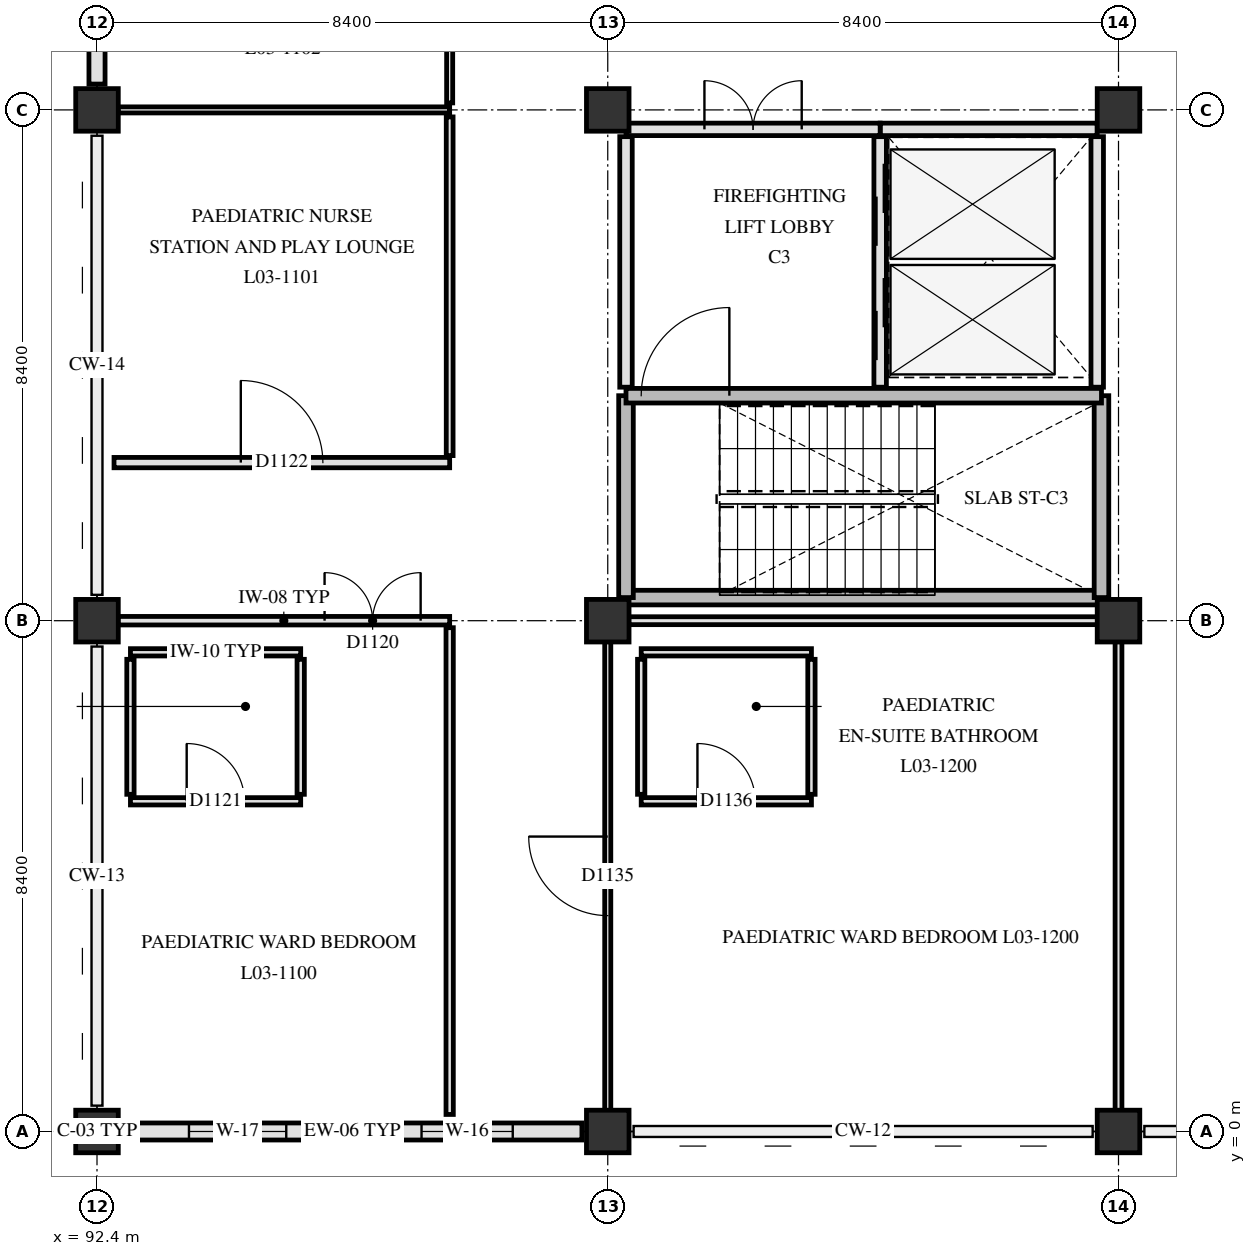
"""IFC4 building model, lengths in metres.
Left out: names, types, materials, properties, quantities, classifications, styles, units other than length and angle.
Written with IfcOpenShell. Run it as: python <this file> out.ifc"""

import sys

from ifc_helpers import new_model, si_unit, direction, frame, frame_2d, origin, origin_2d, place, context, subcontext, project, spatial, rectangle, extrude, element, fill, save


model = new_model("IFC4")
c1 = context("Model", 3, precision=1e-05, world=origin(), true_north=direction((0.0, 1.0)))
c2 = subcontext(c1, "Body", "Model", "MODEL_VIEW")
j1 = project(units=[si_unit("LENGTHUNIT", "METRE"), si_unit("PLANEANGLEUNIT", "RADIAN")], contexts=[c1])
p1 = place(None, origin())
s1 = spatial("IfcSite", under=j1, at=p1, CompositionType="ELEMENT")
p2 = place(p1, origin())
s2 = spatial("IfcBuilding", under=s1, at=p2, CompositionType="ELEMENT")
p3 = place(p2, frame((0.0, 0.0, 14.4)))
s3 = spatial("IfcBuildingStorey", under=s2, at=p3, CompositionType="ELEMENT", Elevation=14.4)
for number, where, z_axis, x_axis in (
    (1, (92.4, 0.0, 0.0), (0.0, 0.0, 1.0), (1.0, 0.0, 0.0)),
    (2, (92.4, 8.4, 0.0), (0.0, 0.0, 1.0), (1.0, 0.0, 0.0)),
    (3, (92.4, 16.8, 0.0), (0.0, 0.0, 1.0), (1.0, 0.0, 0.0)),
    (4, (100.8, 0.0, 0.0), (0.0, 0.0, 1.0), (1.0, 0.0, 0.0)),
    (5, (100.8, 8.4, 0.0), (0.0, 0.0, 1.0), (1.0, 0.0, 0.0)),
    (6, (100.8, 16.8, 0.0), (0.0, 0.0, 1.0), (1.0, 0.0, 0.0)),
    (7, (109.2, 0.0, 0.0), (0.0, 0.0, 1.0), (1.0, 0.0, 0.0)),
    (8, (109.2, 8.4, 0.0), (0.0, 0.0, 1.0), (1.0, 0.0, 0.0)),
    (9, (109.2, 16.8, 0.0), (0.0, 0.0, 1.0), (1.0, 0.0, 0.0)),
):
    element("IfcColumn", number, at=place(p3, frame(where, z_axis=z_axis, x_axis=x_axis)), inside=s3, PredefinedType="COLUMN", context=c2, shape_type="SweptSolid", body=[
        extrude(rectangle(XDim=0.7, YDim=0.7, at=origin_2d()), origin(), (0.0, 0.0, 1.0), 4.2),
    ])
p4 = place(p3, frame((100.375, 0.0, 0.0), z_axis=(0.0, 0.0, 1.0), x_axis=(-1.0, 0.0, 0.0)))
e10 = element("IfcWall", 10, at=p4, inside=s3, PredefinedType="SOLIDWALL", context=c2, shape_type="SweptSolid", body=[
    extrude(rectangle(XDim=7.55, YDim=0.28, at=frame_2d((3.775, 0.0))), origin(), (0.0, 0.0, 1.0), 2.89),
])
p5 = place(p4, frame((1.137, 0.0, 0.85)))
e11 = element("IfcOpeningElement", 11, at=p5, cuts=e10, PredefinedType="OPENING", context=c2, shape_type="SweptSolid", body=[
    extrude(rectangle(XDim=1.5, YDim=1.42, at=frame_2d((0.75, 0.71))), frame((0.0, 0.15, 0.0), z_axis=(0.0, -1.0, 0.0), x_axis=(1.0, 0.0, 0.0)), (0.0, 0.0, 1.0), 0.3),
])
p6 = place(p4, frame((4.863, 0.0, 0.85)))
e12 = element("IfcOpeningElement", 12, at=p6, cuts=e10, PredefinedType="OPENING", context=c2, shape_type="SweptSolid", body=[
    extrude(rectangle(XDim=1.6, YDim=1.42, at=frame_2d((0.8, 0.71))), frame((0.0, 0.15, 0.0), z_axis=(0.0, -1.0, 0.0), x_axis=(1.0, 0.0, 0.0)), (0.0, 0.0, 1.0), 0.3),
])
p7 = place(p3, frame((92.4, 17.225, 0.0), z_axis=(0.0, 0.0, 1.0), x_axis=(0.0, 1.0, 0.0)))
e13 = element("IfcWall", 13, at=p7, inside=s3, PredefinedType="SOLIDWALL", context=c2, shape_type="SweptSolid", body=[
    extrude(rectangle(XDim=7.55, YDim=0.265, at=frame_2d((3.775, 0.0))), origin(), (0.0, 0.0, 1.0), 3.19),
])
p8 = place(p7, frame((1.038, 0.0, 0.85)))
e14 = element("IfcOpeningElement", 14, at=p8, cuts=e13, PredefinedType="OPENING", context=c2, shape_type="SweptSolid", body=[
    extrude(rectangle(XDim=1.7, YDim=1.42, at=frame_2d((0.85, 0.71))), frame((0.0, 0.142, 0.0), z_axis=(0.0, -1.0, 0.0), x_axis=(1.0, 0.0, 0.0)), (0.0, 0.0, 1.0), 0.285),
])
p9 = place(p7, frame((4.762, 0.0, 0.85)))
e15 = element("IfcOpeningElement", 15, at=p9, cuts=e13, PredefinedType="OPENING", context=c2, shape_type="SweptSolid", body=[
    extrude(rectangle(XDim=1.8, YDim=1.42, at=frame_2d((0.9, 0.71))), frame((0.0, 0.142, 0.0), z_axis=(0.0, -1.0, 0.0), x_axis=(1.0, 0.0, 0.0)), (0.0, 0.0, 1.0), 0.285),
])
p10 = place(p3, frame((101.1, 8.78, 0.0), z_axis=(0.0, 0.0, 1.0), x_axis=(1.0, 0.0, 0.0)))
e16 = element("IfcWall", 16, at=p10, inside=s3, PredefinedType="SHEAR", context=c2, shape_type="SweptSolid", body=[
    extrude(rectangle(XDim=7.82, YDim=0.24, at=frame_2d((3.91, 0.0))), origin(), (0.0, 0.0, 1.0), 3.9),
])
for number, where, z_axis, x_axis in (
    (17, (101.1, 8.78, 0.0), (0.0, 0.0, 1.0), (0.0, 1.0, 0.0)),
    (18, (108.92, 8.78, 0.0), (0.0, 0.0, 1.0), (0.0, 1.0, 0.0)),
):
    element("IfcWall", number, at=place(p3, frame(where, z_axis=z_axis, x_axis=x_axis)), inside=s3, PredefinedType="SHEAR", context=c2, shape_type="SweptSolid", body=[
        extrude(rectangle(XDim=3.32, YDim=0.24, at=frame_2d((1.66, 0.0))), origin(), (0.0, 0.0, 1.0), 3.9),
    ])
p11 = place(p3, frame((101.1, 12.1, 0.0), z_axis=(0.0, 0.0, 1.0), x_axis=(1.0, 0.0, 0.0)))
e19 = element("IfcWall", 19, at=p11, inside=s3, PredefinedType="SHEAR", context=c2, shape_type="SweptSolid", body=[
    extrude(rectangle(XDim=7.82, YDim=0.24, at=frame_2d((3.91, 0.0))), origin(), (0.0, 0.0, 1.0), 3.9),
])
p12 = place(p11, frame((0.25, 0.0, 0.0)))
e20 = element("IfcOpeningElement", 20, at=p12, cuts=e19, PredefinedType="OPENING", context=c2, shape_type="SweptSolid", body=[
    extrude(rectangle(XDim=1.45, YDim=2.2, at=frame_2d((0.725, 1.1))), frame((0.0, 0.13, 0.0), z_axis=(0.0, -1.0, 0.0), x_axis=(1.0, 0.0, 0.0)), (0.0, 0.0, 1.0), 0.26),
])
p13 = place(p3, frame((105.28, 12.24, 0.0), z_axis=(0.0, 0.0, 1.0), x_axis=(0.0, 1.0, 0.0)))
e21 = element("IfcWall", 21, at=p13, inside=s3, PredefinedType="PARTITIONING", context=c2, shape_type="SweptSolid", body=[
    extrude(rectangle(XDim=4.12, YDim=0.205, at=frame_2d((2.06, 0.0))), origin(), (0.0, 0.0, 1.0), 3.89),
])
p14 = place(p13, frame((0.445, 0.0, 0.0)))
e22 = element("IfcOpeningElement", 22, at=p14, cuts=e21, PredefinedType="OPENING", context=c2, shape_type="SweptSolid", body=[
    extrude(rectangle(XDim=1.35, YDim=2.2, at=frame_2d((0.675, 1.1))), frame((0.0, 0.113, 0.0), z_axis=(0.0, -1.0, 0.0), x_axis=(1.0, 0.0, 0.0)), (0.0, 0.0, 1.0), 0.225),
])
p15 = place(p13, frame((2.325, 0.0, 0.0)))
e23 = element("IfcOpeningElement", 23, at=p15, cuts=e21, PredefinedType="OPENING", context=c2, shape_type="SweptSolid", body=[
    extrude(rectangle(XDim=1.35, YDim=2.2, at=frame_2d((0.675, 1.1))), frame((0.0, 0.113, 0.0), z_axis=(0.0, -1.0, 0.0), x_axis=(1.0, 0.0, 0.0)), (0.0, 0.0, 1.0), 0.225),
])
p16 = place(p3, frame((108.85, 12.24, 0.0), z_axis=(0.0, 0.0, 1.0), x_axis=(0.0, 1.0, 0.0)))
e24 = element("IfcWall", 24, at=p16, inside=s3, PredefinedType="PARTITIONING", context=c2, shape_type="SweptSolid", body=[
    extrude(rectangle(XDim=4.12, YDim=0.205, at=frame_2d((2.06, 0.0))), origin(), (0.0, 0.0, 1.0), 3.89),
])
p17 = place(p3, frame((105.28, 16.48, 0.0), z_axis=(0.0, 0.0, 1.0), x_axis=(1.0, 0.0, 0.0)))
e25 = element("IfcWall", 25, at=p17, inside=s3, PredefinedType="PARTITIONING", context=c2, shape_type="SweptSolid", body=[
    extrude(rectangle(XDim=3.57, YDim=0.205, at=frame_2d((1.785, 0.0))), origin(), (0.0, 0.0, 1.0), 3.29),
])
p18 = place(p3, frame((101.1, 12.24, 0.0), z_axis=(0.0, 0.0, 1.0), x_axis=(0.0, 1.0, 0.0)))
e26 = element("IfcWall", 26, at=p18, inside=s3, PredefinedType="PARTITIONING", context=c2, shape_type="SweptSolid", body=[
    extrude(rectangle(XDim=4.12, YDim=0.205, at=frame_2d((2.06, 0.0))), origin(), (0.0, 0.0, 1.0), 2.69),
])
p19 = place(p3, frame((101.1, 16.48, 0.0), z_axis=(0.0, 0.0, 1.0), x_axis=(1.0, 0.0, 0.0)))
e27 = element("IfcWall", 27, at=p19, inside=s3, PredefinedType="PARTITIONING", context=c2, shape_type="SweptSolid", body=[
    extrude(rectangle(XDim=4.18, YDim=0.205, at=frame_2d((2.09, 0.0))), origin(), (0.0, 0.0, 1.0), 2.69),
])
p20 = place(p19, frame((1.29, 0.0, 0.0)))
e28 = element("IfcOpeningElement", 28, at=p20, cuts=e27, PredefinedType="OPENING", context=c2, shape_type="SweptSolid", body=[
    extrude(rectangle(XDim=1.6, YDim=2.25, at=frame_2d((0.8, 1.125))), frame((0.0, 0.113, 0.0), z_axis=(0.0, -1.0, 0.0), x_axis=(1.0, 0.0, 0.0)), (0.0, 0.0, 1.0), 0.225),
])
p21 = place(p3, frame((92.95, 5.43, 0.0), z_axis=(0.0, 0.0, 1.0), x_axis=(1.0, 0.0, 0.0)))
e29 = element("IfcWall", 29, at=p21, inside=s3, PredefinedType="PARTITIONING", context=c2, shape_type="SweptSolid", body=[
    extrude(rectangle(XDim=2.8, YDim=0.12, at=frame_2d((1.4, 0.0))), origin(), (0.0, 0.0, 1.0), 3.89),
])
p22 = place(p21, frame((0.925, 0.0, 0.0)))
e30 = element("IfcOpeningElement", 30, at=p22, cuts=e29, PredefinedType="OPENING", context=c2, shape_type="SweptSolid", body=[
    extrude(rectangle(XDim=0.95, YDim=2.1, at=frame_2d((0.475, 1.05))), frame((0.0, 0.07, 0.0), z_axis=(0.0, -1.0, 0.0), x_axis=(1.0, 0.0, 0.0)), (0.0, 0.0, 1.0), 0.14),
])
p23 = place(p3, frame((101.35, 5.43, 0.0), z_axis=(0.0, 0.0, 1.0), x_axis=(1.0, 0.0, 0.0)))
e31 = element("IfcWall", 31, at=p23, inside=s3, PredefinedType="PARTITIONING", context=c2, shape_type="SweptSolid", body=[
    extrude(rectangle(XDim=2.8, YDim=0.12, at=frame_2d((1.4, 0.0))), origin(), (0.0, 0.0, 1.0), 3.89),
])
p24 = place(p23, frame((0.925, 0.0, 0.0)))
e32 = element("IfcOpeningElement", 32, at=p24, cuts=e31, PredefinedType="OPENING", context=c2, shape_type="SweptSolid", body=[
    extrude(rectangle(XDim=0.95, YDim=2.1, at=frame_2d((0.475, 1.05))), frame((0.0, 0.07, 0.0), z_axis=(0.0, -1.0, 0.0), x_axis=(1.0, 0.0, 0.0)), (0.0, 0.0, 1.0), 0.14),
])
p25 = place(p3, frame((92.95, 7.88, 0.0), z_axis=(0.0, 0.0, 1.0), x_axis=(1.0, 0.0, 0.0)))
e33 = element("IfcWall", 33, at=p25, inside=s3, PredefinedType="PARTITIONING", context=c2, shape_type="SweptSolid", body=[
    extrude(rectangle(XDim=2.8, YDim=0.12, at=frame_2d((1.4, 0.0))), origin(), (0.0, 0.0, 1.0), 3.89),
])
p26 = place(p3, frame((101.35, 7.88, 0.0), z_axis=(0.0, 0.0, 1.0), x_axis=(1.0, 0.0, 0.0)))
e34 = element("IfcWall", 34, at=p26, inside=s3, PredefinedType="PARTITIONING", context=c2, shape_type="SweptSolid", body=[
    extrude(rectangle(XDim=2.8, YDim=0.12, at=frame_2d((1.4, 0.0))), origin(), (0.0, 0.0, 1.0), 3.89),
])
p27 = place(p3, frame((92.745, 8.4, 0.0), z_axis=(0.0, 0.0, 1.0), x_axis=(1.0, 0.0, 0.0)))
e35 = element("IfcWall", 35, at=p27, inside=s3, PredefinedType="PARTITIONING", context=c2, shape_type="SweptSolid", body=[
    extrude(rectangle(XDim=5.455, YDim=0.14, at=frame_2d((2.728, 0.0))), origin(), (0.0, 0.0, 1.0), 3.29),
])
p28 = place(p27, frame((3.398, 0.0, 0.0)))
e36 = element("IfcOpeningElement", 36, at=p28, cuts=e35, PredefinedType="OPENING", context=c2, shape_type="SweptSolid", body=[
    extrude(rectangle(XDim=1.58, YDim=2.22, at=frame_2d((0.79, 1.11))), frame((0.0, 0.08, 0.0), z_axis=(0.0, -1.0, 0.0), x_axis=(1.0, 0.0, 0.0)), (0.0, 0.0, 1.0), 0.16),
])
p29 = place(p3, frame((101.145, 8.4, 0.0), z_axis=(0.0, 0.0, 1.0), x_axis=(1.0, 0.0, 0.0)))
e37 = element("IfcWall", 37, at=p29, inside=s3, PredefinedType="PARTITIONING", context=c2, shape_type="SweptSolid", body=[
    extrude(rectangle(XDim=7.71, YDim=0.13, at=frame_2d((3.855, 0.0))), origin(), (0.0, 0.0, 1.0), 3.29),
])
p30 = place(p3, frame((92.68, 11.0, 0.0), z_axis=(0.0, 0.0, 1.0), x_axis=(1.0, 0.0, 0.0)))
e38 = element("IfcWall", 38, at=p30, inside=s3, PredefinedType="PARTITIONING", context=c2, shape_type="SweptSolid", body=[
    extrude(rectangle(XDim=5.52, YDim=0.17, at=frame_2d((2.76, 0.0))), origin(), (0.0, 0.0, 1.0), 3.89),
])
p31 = place(p30, frame((2.085, 0.0, 0.0)))
e39 = element("IfcOpeningElement", 39, at=p31, cuts=e38, PredefinedType="OPENING", context=c2, shape_type="SweptSolid", body=[
    extrude(rectangle(XDim=1.35, YDim=2.2, at=frame_2d((0.675, 1.1))), frame((0.0, 0.095, 0.0), z_axis=(0.0, -1.0, 0.0), x_axis=(1.0, 0.0, 0.0)), (0.0, 0.0, 1.0), 0.19),
])
p32 = place(p3, frame((92.745, 16.8, 0.0), z_axis=(0.0, 0.0, 1.0), x_axis=(1.0, 0.0, 0.0)))
e40 = element("IfcWall", 40, at=p32, inside=s3, PredefinedType="PARTITIONING", context=c2, shape_type="SweptSolid", body=[
    extrude(rectangle(XDim=5.455, YDim=0.1, at=frame_2d((2.728, 0.0))), origin(), (0.0, 0.0, 1.0), 3.29),
])
for number, where, z_axis, x_axis in (
    (41, (92.95, 5.545, 0.0), (0.0, 0.0, 1.0), (0.0, 1.0, 0.0)),
    (42, (95.75, 5.545, 0.0), (0.0, 0.0, 1.0), (0.0, 1.0, 0.0)),
):
    element("IfcWall", number, at=place(p3, frame(where, z_axis=z_axis, x_axis=x_axis)), inside=s3, PredefinedType="PARTITIONING", context=c2, shape_type="SweptSolid", body=[
        extrude(rectangle(XDim=2.22, YDim=0.12, at=frame_2d((1.11, 0.0))), origin(), (0.0, 0.0, 1.0), 3.89),
    ])
p33 = place(p3, frame((98.2, 0.28, 0.0), z_axis=(0.0, 0.0, 1.0), x_axis=(0.0, 1.0, 0.0)))
e43 = element("IfcWall", 43, at=p33, inside=s3, PredefinedType="PARTITIONING", context=c2, shape_type="SweptSolid", body=[
    extrude(rectangle(XDim=8.005, YDim=0.12, at=frame_2d((4.002, 0.0))), origin(), (0.0, 0.0, 1.0), 2.89),
])
p34 = place(p3, frame((98.2, 11.115, 0.0), z_axis=(0.0, 0.0, 1.0), x_axis=(0.0, 1.0, 0.0)))
e44 = element("IfcWall", 44, at=p34, inside=s3, PredefinedType="PARTITIONING", context=c2, shape_type="SweptSolid", body=[
    extrude(rectangle(XDim=5.57, YDim=0.112, at=frame_2d((2.785, 0.0))), origin(), (0.0, 0.0, 1.0), 3.29),
])
p35 = place(p3, frame((98.2, 16.915, 0.0), z_axis=(0.0, 0.0, 1.0), x_axis=(0.0, 1.0, 0.0)))
e45 = element("IfcWall", 45, at=p35, inside=s3, PredefinedType="PARTITIONING", context=c2, shape_type="SweptSolid", body=[
    extrude(rectangle(XDim=5.57, YDim=0.1, at=frame_2d((2.785, 0.0))), origin(), (0.0, 0.0, 1.0), 3.29),
])
p36 = place(p3, frame((100.8, 0.345, 0.0), z_axis=(0.0, 0.0, 1.0), x_axis=(0.0, 1.0, 0.0)))
e46 = element("IfcWall", 46, at=p36, inside=s3, PredefinedType="PARTITIONING", context=c2, shape_type="SweptSolid", body=[
    extrude(rectangle(XDim=7.71, YDim=0.1, at=frame_2d((3.855, 0.0))), origin(), (0.0, 0.0, 1.0), 2.69),
])
p37 = place(p36, frame((3.205, 0.0, 0.0)))
e47 = element("IfcOpeningElement", 47, at=p37, cuts=e46, PredefinedType="OPENING", context=c2, shape_type="SweptSolid", body=[
    extrude(rectangle(XDim=1.3, YDim=2.2, at=frame_2d((0.65, 1.1))), frame((0.0, 0.06, 0.0), z_axis=(0.0, -1.0, 0.0), x_axis=(1.0, 0.0, 0.0)), (0.0, 0.0, 1.0), 0.12),
])
for number, where, z_axis, x_axis in (
    (48, (101.35, 5.545, 0.0), (0.0, 0.0, 1.0), (0.0, 1.0, 0.0)),
    (49, (104.15, 5.545, 0.0), (0.0, 0.0, 1.0), (0.0, 1.0, 0.0)),
):
    element("IfcWall", number, at=place(p3, frame(where, z_axis=z_axis, x_axis=x_axis)), inside=s3, PredefinedType="PARTITIONING", context=c2, shape_type="SweptSolid", body=[
        extrude(rectangle(XDim=2.22, YDim=0.12, at=frame_2d((1.11, 0.0))), origin(), (0.0, 0.0, 1.0), 3.89),
    ])
p38 = place(p3, frame((109.2, 0.345, 0.0), z_axis=(0.0, 0.0, 1.0), x_axis=(0.0, 1.0, 0.0)))
e50 = element("IfcWall", 50, at=p38, inside=s3, PredefinedType="PARTITIONING", context=c2, shape_type="SweptSolid", body=[
    extrude(rectangle(XDim=7.71, YDim=0.112, at=frame_2d((3.855, 0.0))), origin(), (0.0, 0.0, 1.0), 3.34),
])
p39 = place(p5, origin())
e51 = element("IfcWindow", 51, at=p39, inside=s3, PartitioningType="SINGLE_PANEL", PredefinedType="WINDOW", context=c2, shape_type="SweptSolid", body=[
    extrude(rectangle(XDim=1.5, YDim=1.42, at=frame_2d((0.75, 0.71))), frame((0.0, 0.03, 0.0), z_axis=(0.0, -1.0, 0.0), x_axis=(1.0, 0.0, 0.0)), (0.0, 0.0, 1.0), 0.06),
])
fill(e11, e51)
p40 = place(p6, origin())
e52 = element("IfcWindow", 52, at=p40, inside=s3, PartitioningType="SINGLE_PANEL", PredefinedType="WINDOW", context=c2, shape_type="SweptSolid", body=[
    extrude(rectangle(XDim=1.6, YDim=1.42, at=frame_2d((0.8, 0.71))), frame((0.0, 0.03, 0.0), z_axis=(0.0, -1.0, 0.0), x_axis=(1.0, 0.0, 0.0)), (0.0, 0.0, 1.0), 0.06),
])
fill(e12, e52)
p41 = place(p12, origin())
e53 = element("IfcDoor", 53, at=p41, inside=s3, OperationType="SINGLE_SWING_RIGHT", PredefinedType="DOOR", context=c2, shape_type="SweptSolid", body=[
    extrude(rectangle(XDim=1.45, YDim=2.2, at=frame_2d((0.725, 1.1))), frame((0.0, 0.025, 0.0), z_axis=(0.0, -1.0, 0.0), x_axis=(1.0, 0.0, 0.0)), (0.0, 0.0, 1.0), 0.05),
])
fill(e20, e53)
p42 = place(p14, origin())
e54 = element("IfcDoor", 54, at=p42, inside=s3, OperationType="SLIDING_TO_LEFT", PredefinedType="DOOR", context=c2, shape_type="SweptSolid", body=[
    extrude(rectangle(XDim=1.35, YDim=2.2, at=frame_2d((0.675, 1.1))), frame((0.0, 0.025, 0.0), z_axis=(0.0, -1.0, 0.0), x_axis=(1.0, 0.0, 0.0)), (0.0, 0.0, 1.0), 0.05),
])
fill(e22, e54)
p43 = place(p15, origin())
e55 = element("IfcDoor", 55, at=p43, inside=s3, OperationType="SLIDING_TO_LEFT", PredefinedType="DOOR", context=c2, shape_type="SweptSolid", body=[
    extrude(rectangle(XDim=1.35, YDim=2.2, at=frame_2d((0.675, 1.1))), frame((0.0, 0.025, 0.0), z_axis=(0.0, -1.0, 0.0), x_axis=(1.0, 0.0, 0.0)), (0.0, 0.0, 1.0), 0.05),
])
fill(e23, e55)
p44 = place(p20, origin())
e56 = element("IfcDoor", 56, at=p44, inside=s3, OperationType="DOUBLE_SWING_LEFT", PredefinedType="DOOR", context=c2, shape_type="SweptSolid", body=[
    extrude(rectangle(XDim=1.6, YDim=2.25, at=frame_2d((0.8, 1.125))), frame((0.0, 0.025, 0.0), z_axis=(0.0, -1.0, 0.0), x_axis=(1.0, 0.0, 0.0)), (0.0, 0.0, 1.0), 0.05),
])
fill(e28, e56)
p45 = place(p28, origin())
e57 = element("IfcDoor", 57, at=p45, inside=s3, OperationType="DOUBLE_SWING_LEFT", PredefinedType="DOOR", context=c2, shape_type="SweptSolid", body=[
    extrude(rectangle(XDim=1.58, YDim=2.22, at=frame_2d((0.79, 1.11))), frame((0.0, 0.025, 0.0), z_axis=(0.0, -1.0, 0.0), x_axis=(1.0, 0.0, 0.0)), (0.0, 0.0, 1.0), 0.05),
])
fill(e36, e57)
p46 = place(p22, origin())
e58 = element("IfcDoor", 58, at=p46, inside=s3, OperationType="SINGLE_SWING_LEFT", PredefinedType="DOOR", context=c2, shape_type="SweptSolid", body=[
    extrude(rectangle(XDim=0.95, YDim=2.1, at=frame_2d((0.475, 1.05))), frame((0.0, 0.025, 0.0), z_axis=(0.0, -1.0, 0.0), x_axis=(1.0, 0.0, 0.0)), (0.0, 0.0, 1.0), 0.05),
])
fill(e30, e58)
p47 = place(p31, origin())
e59 = element("IfcDoor", 59, at=p47, inside=s3, OperationType="SINGLE_SWING_LEFT", PredefinedType="DOOR", context=c2, shape_type="SweptSolid", body=[
    extrude(rectangle(XDim=1.35, YDim=2.2, at=frame_2d((0.675, 1.1))), frame((0.0, 0.025, 0.0), z_axis=(0.0, -1.0, 0.0), x_axis=(1.0, 0.0, 0.0)), (0.0, 0.0, 1.0), 0.05),
])
fill(e39, e59)
p48 = place(p37, origin())
e60 = element("IfcDoor", 60, at=p48, inside=s3, OperationType="SINGLE_SWING_RIGHT", PredefinedType="DOOR", context=c2, shape_type="SweptSolid", body=[
    extrude(rectangle(XDim=1.3, YDim=2.2, at=frame_2d((0.65, 1.1))), frame((0.0, 0.025, 0.0), z_axis=(0.0, -1.0, 0.0), x_axis=(1.0, 0.0, 0.0)), (0.0, 0.0, 1.0), 0.05),
])
fill(e47, e60)
p49 = place(p24, origin())
e61 = element("IfcDoor", 61, at=p49, inside=s3, OperationType="SINGLE_SWING_LEFT", PredefinedType="DOOR", context=c2, shape_type="SweptSolid", body=[
    extrude(rectangle(XDim=0.95, YDim=2.1, at=frame_2d((0.475, 1.05))), frame((0.0, 0.025, 0.0), z_axis=(0.0, -1.0, 0.0), x_axis=(1.0, 0.0, 0.0)), (0.0, 0.0, 1.0), 0.05),
])
fill(e32, e61)
save(model, sys.argv[1])
